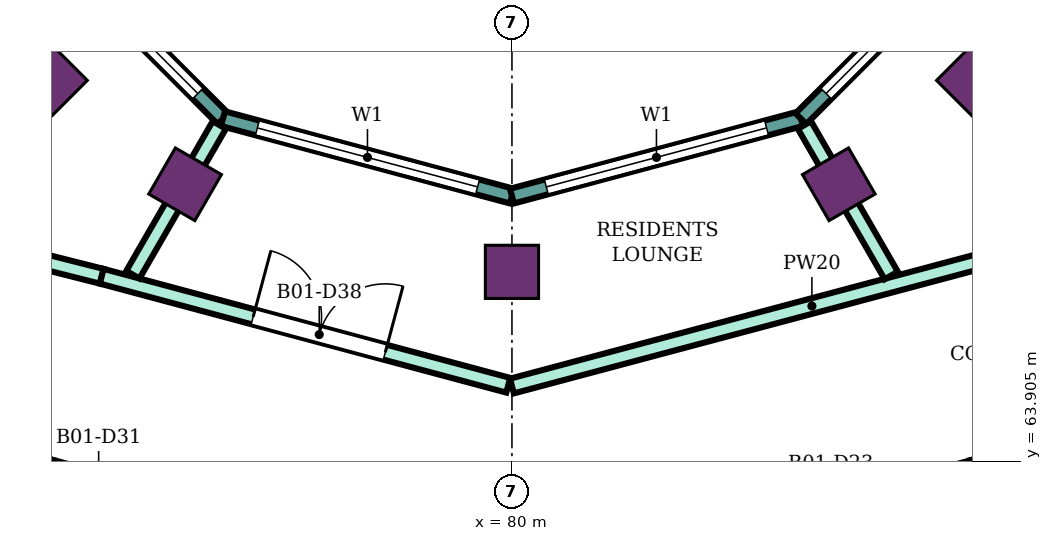
"""IFC4 building model, lengths in metres.
Left out: names, types, materials, properties, quantities, classifications, styles, units other than length and angle.
Written with IfcOpenShell. Run it as: python <this file> out.ifc"""

import sys

from ifc_helpers import new_model, si_unit, direction, frame, frame_2d, origin, origin_2d, place, context, subcontext, project, spatial, rectangle, extrude, element, fill, save


model = new_model("IFC4")
c1 = context("Model", 3, precision=1e-05, world=origin(), true_north=direction((0.0, 1.0)))
c2 = subcontext(c1, "Body", "Model", "MODEL_VIEW")
j1 = project(units=[si_unit("LENGTHUNIT", "METRE"), si_unit("PLANEANGLEUNIT", "RADIAN")], contexts=[c1])
p1 = place(None, origin())
s1 = spatial("IfcSite", under=j1, at=p1, CompositionType="ELEMENT")
p2 = place(p1, origin())
s2 = spatial("IfcBuilding", under=s1, at=p2, CompositionType="ELEMENT")
p3 = place(p2, frame((0.0, 0.0, 212.5)))
s3 = spatial("IfcBuildingStorey", under=s2, at=p3, CompositionType="ELEMENT", Elevation=212.5)
for number, where, z_axis, x_axis in (
    (1, (73.919, 68.919, 0.0), (0.0, 0.0, 1.0), (-0.707, -0.707, 0.0)),
    (2, (75.7, 67.552, 0.0), (0.0, 0.0, 1.0), (-0.5, -0.866, 0.0)),
    (3, (80.0, 66.4, 0.0), (0.0, 0.0, 1.0), (0.0, -1.0, 0.0)),
    (4, (84.3, 67.552, 0.0), (0.0, 0.0, 1.0), (0.5, -0.866, 0.0)),
    (5, (86.081, 68.919, 0.0), (0.0, 0.0, 1.0), (0.707, -0.707, 0.0)),
):
    element("IfcColumn", number, at=place(p3, frame(where, z_axis=z_axis, x_axis=x_axis)), inside=s3, PredefinedType="COLUMN", context=c2, shape_type="SweptSolid", body=[
        extrude(rectangle(XDim=0.7, YDim=0.7, at=origin_2d()), origin(), (0.0, 0.0, 1.0), 4.2),
    ])
p4 = place(p3, frame((73.415, 71.198, 0.0), z_axis=(0.0, 0.0, 1.0), x_axis=(0.707106781187, -0.707106781187, 0.0)))
e6 = element("IfcWall", 6, at=p4, inside=s3, PredefinedType="NOTDEFINED", context=c2, shape_type="SweptSolid", body=[
    extrude(rectangle(XDim=3.936, YDim=0.2, at=frame_2d((1.968, 0.0))), origin(), (0.0, 0.0, 1.0), 4.2),
])
p5 = place(p4, frame((0.468, 0.0, 0.9)))
e7 = element("IfcOpeningElement", 7, at=p5, cuts=e6, PredefinedType="OPENING", context=c2, shape_type="SweptSolid", body=[
    extrude(rectangle(XDim=3.0, YDim=2.3, at=frame_2d((1.5, 1.15))), frame((0.0, 0.11, 0.0), z_axis=(0.0, -1.0, 0.0), x_axis=(1.0, 0.0, 0.0)), (0.0, 0.0, 1.0), 0.22),
])
p6 = place(p3, frame((76.198, 68.415, 0.0), z_axis=(0.0, 0.0, 1.0), x_axis=(0.965933654434, -0.258789828301, 0.0)))
e8 = element("IfcWall", 8, at=p6, inside=s3, PredefinedType="NOTDEFINED", context=c2, shape_type="SweptSolid", body=[
    extrude(rectangle(XDim=3.936, YDim=0.2, at=frame_2d((1.968, 0.0))), origin(), (0.0, 0.0, 1.0), 4.2),
])
p7 = place(p6, frame((0.468, 0.0, 0.9)))
e9 = element("IfcOpeningElement", 9, at=p7, cuts=e8, PredefinedType="OPENING", context=c2, shape_type="SweptSolid", body=[
    extrude(rectangle(XDim=3.0, YDim=2.3, at=frame_2d((1.5, 1.15))), frame((0.0, 0.11, 0.0), z_axis=(0.0, -1.0, 0.0), x_axis=(1.0, 0.0, 0.0)), (0.0, 0.0, 1.0), 0.22),
])
p8 = place(p3, frame((80.0, 67.396, 0.0), z_axis=(0.0, 0.0, 1.0), x_axis=(0.965933654434, 0.258789828301, 0.0)))
e10 = element("IfcWall", 10, at=p8, inside=s3, PredefinedType="NOTDEFINED", context=c2, shape_type="SweptSolid", body=[
    extrude(rectangle(XDim=3.936, YDim=0.2, at=frame_2d((1.968, 0.0))), origin(), (0.0, 0.0, 1.0), 4.2),
])
p9 = place(p8, frame((0.468, 0.0, 0.9)))
e11 = element("IfcOpeningElement", 11, at=p9, cuts=e10, PredefinedType="OPENING", context=c2, shape_type="SweptSolid", body=[
    extrude(rectangle(XDim=3.0, YDim=2.3, at=frame_2d((1.5, 1.15))), frame((0.0, 0.11, 0.0), z_axis=(0.0, -1.0, 0.0), x_axis=(1.0, 0.0, 0.0)), (0.0, 0.0, 1.0), 0.22),
])
p10 = place(p3, frame((83.802, 68.415, 0.0), z_axis=(0.0, 0.0, 1.0), x_axis=(0.707106781187, 0.707106781187, 0.0)))
e12 = element("IfcWall", 12, at=p10, inside=s3, PredefinedType="NOTDEFINED", context=c2, shape_type="SweptSolid", body=[
    extrude(rectangle(XDim=3.936, YDim=0.2, at=frame_2d((1.968, 0.0))), origin(), (0.0, 0.0, 1.0), 4.2),
])
p11 = place(p10, frame((0.468, 0.0, 0.9)))
e13 = element("IfcOpeningElement", 13, at=p11, cuts=e12, PredefinedType="OPENING", context=c2, shape_type="SweptSolid", body=[
    extrude(rectangle(XDim=3.0, YDim=2.3, at=frame_2d((1.5, 1.15))), frame((0.0, 0.11, 0.0), z_axis=(0.0, -1.0, 0.0), x_axis=(1.0, 0.0, 0.0)), (0.0, 0.0, 1.0), 0.22),
])
p12 = place(p3, frame((69.86, 64.86, 0.0), z_axis=(0.0, 0.0, 1.0), x_axis=(0.96942980222, -0.245368821506, 0.0)))
e14 = element("IfcWall", 14, at=p12, inside=s3, PredefinedType="PARTITIONING", context=c2, shape_type="SweptSolid", body=[
    extrude(rectangle(XDim=4.216, YDim=0.2, at=frame_2d((2.108, 0.0))), origin(), (0.0, 0.0, 1.0), 3.75),
])
p13 = place(p12, frame((2.331, 0.0, 0.0)))
e15 = element("IfcOpeningElement", 15, at=p13, cuts=e14, PredefinedType="OPENING", context=c2, shape_type="SweptSolid", body=[
    extrude(rectangle(XDim=1.0, YDim=2.1, at=frame_2d((0.5, 1.05))), frame((0.0, 0.11, 0.0), z_axis=(0.0, -1.0, 0.0), x_axis=(1.0, 0.0, 0.0)), (0.0, 0.0, 1.0), 0.22),
])
p14 = place(p3, frame((72.1, 66.975, 0.0), z_axis=(0.0, 0.0, 1.0), x_axis=(0.969471314457, -0.245204752086, 0.0)))
e16 = element("IfcWall", 16, at=p14, inside=s3, PredefinedType="PARTITIONING", context=c2, shape_type="SweptSolid", body=[
    extrude(rectangle(XDim=2.582, YDim=0.2, at=frame_2d((1.291, 0.0))), origin(), (0.0, 0.0, 1.0), 3.75),
])
p15 = place(p14, frame((0.841, 0.0, 0.0)))
e17 = element("IfcOpeningElement", 17, at=p15, cuts=e16, PredefinedType="OPENING", context=c2, shape_type="SweptSolid", body=[
    extrude(rectangle(XDim=0.9, YDim=2.1, at=frame_2d((0.45, 1.05))), frame((0.0, 0.11, 0.0), z_axis=(0.0, -1.0, 0.0), x_axis=(1.0, 0.0, 0.0)), (0.0, 0.0, 1.0), 0.22),
])
p16 = place(p3, frame((73.947, 63.826, 0.0), z_axis=(0.0, 0.0, 1.0), x_axis=(0.965876152316, -0.259004359784, 0.0)))
e18 = element("IfcWall", 18, at=p16, inside=s3, PredefinedType="PARTITIONING", context=c2, shape_type="SweptSolid", body=[
    extrude(rectangle(XDim=6.217, YDim=0.2, at=frame_2d((3.108, 0.0))), origin(), (0.0, 0.0, 1.0), 3.75),
])
p17 = place(p16, frame((0.137, 0.0, 0.0)))
e19 = element("IfcOpeningElement", 19, at=p17, cuts=e18, PredefinedType="OPENING", context=c2, shape_type="SweptSolid", body=[
    extrude(rectangle(XDim=1.0, YDim=2.1, at=frame_2d((0.5, 1.05))), frame((0.0, 0.11, 0.0), z_axis=(0.0, -1.0, 0.0), x_axis=(1.0, 0.0, 0.0)), (0.0, 0.0, 1.0), 0.22),
])
p18 = place(p3, frame((74.603, 66.342, 0.0), z_axis=(0.0, 0.0, 1.0), x_axis=(0.965895298152, -0.258932950796, 0.0)))
e20 = element("IfcWall", 20, at=p18, inside=s3, PredefinedType="PARTITIONING", context=c2, shape_type="SweptSolid", body=[
    extrude(rectangle(XDim=5.538, YDim=0.2, at=frame_2d((2.769, 0.0))), origin(), (0.0, 0.0, 1.0), 3.75),
])
p19 = place(p18, frame((2.062, 0.0, 0.0)))
e21 = element("IfcOpeningElement", 21, at=p19, cuts=e20, PredefinedType="OPENING", context=c2, shape_type="SweptSolid", body=[
    extrude(rectangle(XDim=1.8, YDim=2.1, at=frame_2d((0.9, 1.05))), frame((0.0, 0.11, 0.0), z_axis=(0.0, -1.0, 0.0), x_axis=(1.0, 0.0, 0.0)), (0.0, 0.0, 1.0), 0.22),
])
p20 = place(p3, frame((75.013, 66.363, 0.0), z_axis=(0.0, 0.0, 1.0), x_axis=(0.500121996664, 0.86595495752, 0.0)))
e22 = element("IfcWall", 22, at=p20, inside=s3, PredefinedType="PARTITIONING", context=c2, shape_type="SweptSolid", body=[
    extrude(rectangle(XDim=2.274, YDim=0.2, at=frame_2d((1.137, 0.0))), origin(), (0.0, 0.0, 1.0), 3.75),
])
p21 = place(p3, frame((80.0, 64.898, 0.0), z_axis=(0.0, 0.0, 1.0), x_axis=(0.966237419782, 0.257653349704, 0.0)))
e23 = element("IfcWall", 23, at=p21, inside=s3, PredefinedType="PARTITIONING", context=c2, shape_type="SweptSolid", body=[
    extrude(rectangle(XDim=8.169, YDim=0.2, at=frame_2d((4.084, 0.0))), origin(), (0.0, 0.0, 1.0), 3.75),
])
p22 = place(p21, frame((6.428, 0.0, 0.0)))
e24 = element("IfcOpeningElement", 24, at=p22, cuts=e23, PredefinedType="OPENING", context=c2, shape_type="SweptSolid", body=[
    extrude(rectangle(XDim=0.9, YDim=2.1, at=frame_2d((0.45, 1.05))), frame((0.0, 0.11, 0.0), z_axis=(0.0, -1.0, 0.0), x_axis=(1.0, 0.0, 0.0)), (0.0, 0.0, 1.0), 0.22),
])
p23 = place(p3, frame((80.048, 62.217, 0.0), z_axis=(0.0, 0.0, 1.0), x_axis=(0.966097920642, 0.258175923996, 0.0)))
e25 = element("IfcWall", 25, at=p23, inside=s3, PredefinedType="PARTITIONING", context=c2, shape_type="SweptSolid", body=[
    extrude(rectangle(XDim=6.217, YDim=0.2, at=frame_2d((3.108, 0.0))), origin(), (0.0, 0.0, 1.0), 3.75),
])
p24 = place(p23, frame((3.792, 0.0, 0.0)))
e26 = element("IfcOpeningElement", 26, at=p24, cuts=e25, PredefinedType="OPENING", context=c2, shape_type="SweptSolid", body=[
    extrude(rectangle(XDim=1.0, YDim=2.1, at=frame_2d((0.5, 1.05))), frame((0.0, 0.11, 0.0), z_axis=(0.0, -1.0, 0.0), x_axis=(1.0, 0.0, 0.0)), (0.0, 0.0, 1.0), 0.22),
])
p25 = place(p3, frame((83.848, 68.331, 0.0), z_axis=(0.0, 0.0, 1.0), x_axis=(0.499851978358, -0.866110847255, 0.0)))
e27 = element("IfcWall", 27, at=p25, inside=s3, PredefinedType="PARTITIONING", context=c2, shape_type="SweptSolid", body=[
    extrude(rectangle(XDim=2.284, YDim=0.2, at=frame_2d((1.142, 0.0))), origin(), (0.0, 0.0, 1.0), 3.75),
])
p26 = place(p3, frame((86.053, 63.826, 0.0), z_axis=(0.0, 0.0, 1.0), x_axis=(0.969490004987, 0.245130843083, 0.0)))
e28 = element("IfcWall", 28, at=p26, inside=s3, PredefinedType="PARTITIONING", context=c2, shape_type="SweptSolid", body=[
    extrude(rectangle(XDim=5.908, YDim=0.2, at=frame_2d((2.954, 0.0))), origin(), (0.0, 0.0, 1.0), 3.75),
])
p27 = place(p5, origin())
e29 = element("IfcWindow", 29, at=p27, inside=s3, PartitioningType="SINGLE_PANEL", PredefinedType="WINDOW", context=c2, shape_type="SweptSolid", body=[
    extrude(rectangle(XDim=3.0, YDim=2.3, at=frame_2d((1.5, 1.15))), frame((0.0, 0.03, 0.0), z_axis=(0.0, -1.0, 0.0), x_axis=(1.0, 0.0, 0.0)), (0.0, 0.0, 1.0), 0.06),
])
fill(e7, e29)
p28 = place(p7, origin())
e30 = element("IfcWindow", 30, at=p28, inside=s3, PartitioningType="SINGLE_PANEL", PredefinedType="WINDOW", context=c2, shape_type="SweptSolid", body=[
    extrude(rectangle(XDim=3.0, YDim=2.3, at=frame_2d((1.5, 1.15))), frame((0.0, 0.03, 0.0), z_axis=(0.0, -1.0, 0.0), x_axis=(1.0, 0.0, 0.0)), (0.0, 0.0, 1.0), 0.06),
])
fill(e9, e30)
p29 = place(p9, origin())
e31 = element("IfcWindow", 31, at=p29, inside=s3, PartitioningType="SINGLE_PANEL", PredefinedType="WINDOW", context=c2, shape_type="SweptSolid", body=[
    extrude(rectangle(XDim=3.0, YDim=2.3, at=frame_2d((1.5, 1.15))), frame((0.0, 0.03, 0.0), z_axis=(0.0, -1.0, 0.0), x_axis=(1.0, 0.0, 0.0)), (0.0, 0.0, 1.0), 0.06),
])
fill(e11, e31)
p30 = place(p11, origin())
e32 = element("IfcWindow", 32, at=p30, inside=s3, PartitioningType="SINGLE_PANEL", PredefinedType="WINDOW", context=c2, shape_type="SweptSolid", body=[
    extrude(rectangle(XDim=3.0, YDim=2.3, at=frame_2d((1.5, 1.15))), frame((0.0, 0.03, 0.0), z_axis=(0.0, -1.0, 0.0), x_axis=(1.0, 0.0, 0.0)), (0.0, 0.0, 1.0), 0.06),
])
fill(e13, e32)
p31 = place(p19, origin())
e33 = element("IfcDoor", 33, at=p31, inside=s3, OperationType="DOUBLE_DOOR_SINGLE_SWING", PredefinedType="DOOR", context=c2, shape_type="SweptSolid", body=[
    extrude(rectangle(XDim=1.8, YDim=2.1, at=frame_2d((0.9, 1.05))), frame((0.0, 0.025, 0.0), z_axis=(0.0, -1.0, 0.0), x_axis=(1.0, 0.0, 0.0)), (0.0, 0.0, 1.0), 0.05),
])
fill(e21, e33)
save(model, sys.argv[1])
